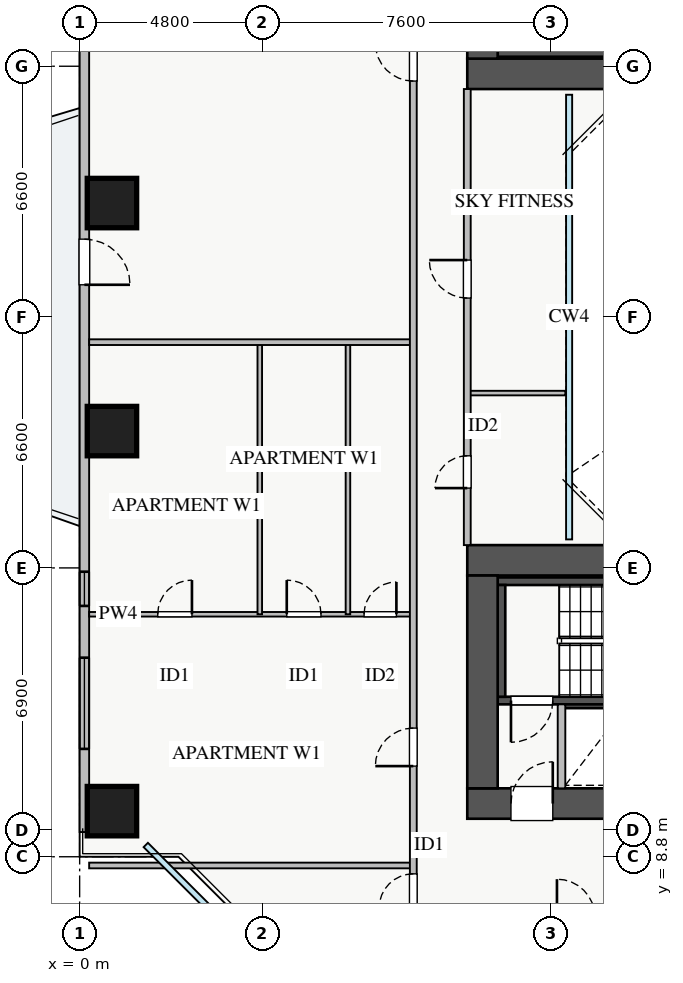
"""IFC4 building model, lengths in metres.
Left out: names, types, materials, properties, quantities, classifications, styles, units other than length and angle.
Written with IfcOpenShell. Run it as: python <this file> out.ifc"""

import sys

from ifc_helpers import new_model, si_unit, direction, frame, frame_2d, origin, origin_2d, place, context, subcontext, project, spatial, rectangle, extrude, source, transform, mapped, element, fill, save


model = new_model("IFC4")
c1 = context("Model", 3, precision=1e-05, world=origin(), true_north=direction((0.0, 1.0)))
c2 = subcontext(c1, "Body", "Model", "MODEL_VIEW")
j1 = project(units=[si_unit("LENGTHUNIT", "METRE"), si_unit("PLANEANGLEUNIT", "RADIAN")], contexts=[c1])
p1 = place(None, origin())
s1 = spatial("IfcSite", under=j1, at=p1, CompositionType="ELEMENT")
p2 = place(p1, origin())
s2 = spatial("IfcBuilding", under=s1, at=p2, CompositionType="ELEMENT")
p3 = place(p2, frame((0.0, 0.0, 26.25)))
s3 = spatial("IfcBuildingStorey", under=s2, at=p3, CompositionType="ELEMENT", Elevation=26.25)
p4 = place(p3, frame((12.68, 12.8, 0.0), z_axis=(0.0, 0.0, 1.0), x_axis=(1.0, 0.0, 0.0)))
e1 = element("IfcWall", 1, at=p4, inside=s3, PredefinedType="SHEAR", context=c2, shape_type="SweptSolid", body=[
    extrude(rectangle(XDim=1.94, YDim=0.18, at=frame_2d((0.97, 0.0))), origin(), (0.0, 0.0, 1.0), 3.07),
])
p5 = place(p3, frame((11.0, 29.95, 0.0), z_axis=(0.0, 0.0, 1.0), x_axis=(1.0, 0.0, 0.0)))
e2 = element("IfcWall", 2, at=p5, inside=s3, PredefinedType="SHEAR", context=c2, shape_type="SweptSolid", body=[
    extrude(rectangle(XDim=7.15, YDim=0.2, at=frame_2d((3.575, 0.0))), origin(), (0.0, 0.0, 1.0), 3.25),
])
p6 = place(p3, frame((11.0, 12.91, 0.0), z_axis=(0.0, 0.0, 1.0), x_axis=(1.0, 0.0, 0.0)))
e3 = element("IfcWall", 3, at=p6, inside=s3, PredefinedType="SHEAR", context=c2, shape_type="SweptSolid", body=[
    extrude(rectangle(XDim=7.15, YDim=0.2, at=frame_2d((3.575, 0.0))), origin(), (0.0, 0.0, 1.0), 3.25),
])
p7 = place(p6, frame((0.35, 0.0, 0.0)))
e4 = element("IfcOpeningElement", 4, at=p7, cuts=e3, PredefinedType="OPENING", context=c2, shape_type="SweptSolid", body=[
    extrude(rectangle(XDim=1.1, YDim=2.05, at=frame_2d((0.55, 1.025))), frame((0.0, 0.11, 0.0), z_axis=(0.0, -1.0, 0.0), x_axis=(1.0, 0.0, 0.0)), (0.0, 0.0, 1.0), 0.22),
])
p8 = place(p3, frame((11.0, 16.05, 0.0), z_axis=(0.0, 0.0, 1.0), x_axis=(1.0, 0.0, 0.0)))
e5 = element("IfcWall", 5, at=p8, inside=s3, PredefinedType="SHEAR", context=c2, shape_type="SweptSolid", body=[
    extrude(rectangle(XDim=7.15, YDim=0.2, at=frame_2d((3.575, 0.0))), origin(), (0.0, 0.0, 1.0), 3.25),
])
p9 = place(p3, frame((11.1, 13.01, 0.0), z_axis=(0.0, 0.0, 1.0), x_axis=(0.0, 1.0, 0.0)))
e6 = element("IfcWall", 6, at=p9, inside=s3, PredefinedType="SHEAR", context=c2, shape_type="SweptSolid", body=[
    extrude(rectangle(XDim=2.94, YDim=0.2, at=frame_2d((1.47, 0.0))), origin(), (0.0, 0.0, 1.0), 3.25),
])
p10 = place(p3, frame((10.2, 29.4, 0.0), z_axis=(0.0, 0.0, 1.0), x_axis=(1.0, 0.0, 0.0)))
e7 = element("IfcWall", 7, at=p10, inside=s3, PredefinedType="SHEAR", context=c2, shape_type="SweptSolid", body=[
    extrude(rectangle(XDim=17.6, YDim=0.8, at=frame_2d((8.8, 0.0))), origin(), (0.0, 0.0, 1.0), 3.25),
])
p11 = place(p3, frame((10.6, 29.8, 0.0), z_axis=(0.0, 0.0, 1.0), x_axis=(0.0, 1.0, 0.0)))
e8 = element("IfcWall", 8, at=p11, inside=s3, PredefinedType="SHEAR", context=c2, shape_type="SweptSolid", body=[
    extrude(rectangle(XDim=5.6, YDim=0.8, at=frame_2d((2.8, 0.0))), origin(), (0.0, 0.0, 1.0), 3.25),
])
p12 = place(p3, frame((10.2, 10.2, 0.0), z_axis=(0.0, 0.0, 1.0), x_axis=(1.0, 0.0, 0.0)))
e9 = element("IfcWall", 9, at=p12, inside=s3, PredefinedType="SHEAR", context=c2, shape_type="SweptSolid", body=[
    extrude(rectangle(XDim=17.6, YDim=0.8, at=frame_2d((8.8, 0.0))), origin(), (0.0, 0.0, 1.0), 3.25),
])
p13 = place(p12, frame((1.15, 0.0, 0.0)))
e10 = element("IfcOpeningElement", 10, at=p13, cuts=e9, PredefinedType="OPENING", context=c2, shape_type="SweptSolid", body=[
    extrude(rectangle(XDim=1.1, YDim=2.05, at=frame_2d((0.55, 1.025))), frame((0.0, 0.41, 0.0), z_axis=(0.0, -1.0, 0.0), x_axis=(1.0, 0.0, 0.0)), (0.0, 0.0, 1.0), 0.82),
])
p14 = place(p12, frame((8.3, 0.0, 0.0)))
e11 = element("IfcOpeningElement", 11, at=p14, cuts=e9, PredefinedType="OPENING", context=c2, shape_type="SweptSolid", body=[
    extrude(rectangle(XDim=1.1, YDim=2.05, at=frame_2d((0.55, 1.025))), frame((0.0, 0.41, 0.0), z_axis=(0.0, -1.0, 0.0), x_axis=(1.0, 0.0, 0.0)), (0.0, 0.0, 1.0), 0.82),
])
p15 = place(p12, frame((10.05, 0.0, 0.0)))
e12 = element("IfcOpeningElement", 12, at=p15, cuts=e9, PredefinedType="OPENING", context=c2, shape_type="SweptSolid", body=[
    extrude(rectangle(XDim=1.1, YDim=2.05, at=frame_2d((0.55, 1.025))), frame((0.0, 0.41, 0.0), z_axis=(0.0, -1.0, 0.0), x_axis=(1.0, 0.0, 0.0)), (0.0, 0.0, 1.0), 0.82),
])
p16 = place(p12, frame((14.74, 0.0, 0.0)))
e13 = element("IfcOpeningElement", 13, at=p16, cuts=e9, PredefinedType="OPENING", context=c2, shape_type="SweptSolid", body=[
    extrude(rectangle(XDim=1.0, YDim=2.05, at=frame_2d((0.5, 1.025))), frame((0.0, 0.41, 0.0), z_axis=(0.0, -1.0, 0.0), x_axis=(1.0, 0.0, 0.0)), (0.0, 0.0, 1.0), 0.82),
])
p17 = place(p12, frame((11.945, 0.0, 0.0)))
e14 = element("IfcOpeningElement", 14, at=p17, cuts=e9, PredefinedType="OPENING", context=c2, shape_type="SweptSolid", body=[
    extrude(rectangle(XDim=1.0, YDim=2.05, at=frame_2d((0.5, 1.025))), frame((0.0, 0.41, 0.0), z_axis=(0.0, -1.0, 0.0), x_axis=(1.0, 0.0, 0.0)), (0.0, 0.0, 1.0), 0.82),
])
p18 = place(p12, frame((13.48, 0.0, 0.0)))
e15 = element("IfcOpeningElement", 15, at=p18, cuts=e9, PredefinedType="OPENING", context=c2, shape_type="SweptSolid", body=[
    extrude(rectangle(XDim=1.0, YDim=2.05, at=frame_2d((0.5, 1.025))), frame((0.0, 0.41, 0.0), z_axis=(0.0, -1.0, 0.0), x_axis=(1.0, 0.0, 0.0)), (0.0, 0.0, 1.0), 0.82),
])
p19 = place(p3, frame((10.2, 16.6, 0.0), z_axis=(0.0, 0.0, 1.0), x_axis=(1.0, 0.0, 0.0)))
e16 = element("IfcWall", 16, at=p19, inside=s3, PredefinedType="SHEAR", context=c2, shape_type="SweptSolid", body=[
    extrude(rectangle(XDim=17.6, YDim=0.8, at=frame_2d((8.8, 0.0))), origin(), (0.0, 0.0, 1.0), 3.25),
])
p20 = place(p3, frame((10.6, 10.6, 0.0), z_axis=(0.0, 0.0, 1.0), x_axis=(0.0, 1.0, 0.0)))
e17 = element("IfcWall", 17, at=p20, inside=s3, PredefinedType="SHEAR", context=c2, shape_type="SweptSolid", body=[
    extrude(rectangle(XDim=5.6, YDim=0.8, at=frame_2d((2.8, 0.0))), origin(), (0.0, 0.0, 1.0), 3.25),
])
m1 = source(origin(), c2, "Body", "SweptSolid", [
    extrude(rectangle(XDim=1.3, YDim=1.3, at=origin_2d()), origin(), (0.0, 0.0, 1.0), 3.25),
])
for number, where, z_axis, x_axis in (
    (18, (0.85, 26.0, 0.0), (0.0, 0.0, 1.0), (1.0, 0.0, 0.0)),
    (19, (0.85, 20.0, 0.0), (0.0, 0.0, 1.0), (1.0, 0.0, 0.0)),
    (20, (0.85, 10.0, 0.0), (0.0, 0.0, 1.0), (1.0, 0.0, 0.0)),
):
    element("IfcColumn", number, at=place(p3, frame(where, z_axis=z_axis, x_axis=x_axis)), inside=s3, PredefinedType="COLUMN", context=c2, shape_type="MappedRepresentation", body=[
        mapped(m1, transform((0.0, 0.0, 0.0), x_axis=(1.0, 0.0, 0.0), y_axis=(0.0, 1.0, 0.0), z_axis=(0.0, 0.0, 1.0), scale=1.0)),
    ])
p21 = place(p3, frame((0.125, 9.45, 0.0), z_axis=(0.0, 0.0, 1.0), x_axis=(0.0, 1.0, 0.0)))
e21 = element("IfcWall", 21, at=p21, inside=s3, PredefinedType="STANDARD", context=c2, shape_type="SweptSolid", body=[
    extrude(rectangle(XDim=27.1, YDim=0.25, at=frame_2d((13.55, 0.0))), origin(), (0.0, 0.0, 1.0), 2.61),
])
p22 = place(p21, frame((14.4, 0.0, 0.0)))
e22 = element("IfcOpeningElement", 22, at=p22, cuts=e21, PredefinedType="OPENING", context=c2, shape_type="SweptSolid", body=[
    extrude(rectangle(XDim=1.2, YDim=2.1, at=frame_2d((0.6, 1.05))), frame((0.0, 0.135, 0.0), z_axis=(0.0, -1.0, 0.0), x_axis=(1.0, 0.0, 0.0)), (0.0, 0.0, 1.0), 0.27),
])
p23 = place(p21, frame((2.188, 0.0, 0.9)))
e23 = element("IfcOpeningElement", 23, at=p23, cuts=e21, PredefinedType="OPENING", context=c2, shape_type="SweptSolid", body=[
    extrude(rectangle(XDim=2.4, YDim=1.48, at=frame_2d((1.2, 0.74))), frame((0.0, 0.135, 0.0), z_axis=(0.0, -1.0, 0.0), x_axis=(1.0, 0.0, 0.0)), (0.0, 0.0, 1.0), 0.27),
])
p24 = place(p21, frame((22.663, 0.0, 0.9)))
e24 = element("IfcOpeningElement", 24, at=p24, cuts=e21, PredefinedType="OPENING", context=c2, shape_type="SweptSolid", body=[
    extrude(rectangle(XDim=2.1, YDim=1.48, at=frame_2d((1.05, 0.74))), frame((0.0, 0.135, 0.0), z_axis=(0.0, -1.0, 0.0), x_axis=(1.0, 0.0, 0.0)), (0.0, 0.0, 1.0), 0.27),
])
p25 = place(p21, frame((5.95, 0.0, 0.9)))
e25 = element("IfcOpeningElement", 25, at=p25, cuts=e21, PredefinedType="OPENING", context=c2, shape_type="SweptSolid", body=[
    extrude(rectangle(XDim=0.9, YDim=1.2, at=frame_2d((0.45, 0.6))), frame((0.0, 0.135, 0.0), z_axis=(0.0, -1.0, 0.0), x_axis=(1.0, 0.0, 0.0)), (0.0, 0.0, 1.0), 0.27),
])
p26 = place(p3, frame((12.68, 10.6, 0.0), z_axis=(0.0, 0.0, 1.0), x_axis=(0.0, 1.0, 0.0)))
e26 = element("IfcWall", 26, at=p26, inside=s3, PredefinedType="PARTITIONING", context=c2, shape_type="SweptSolid", body=[
    extrude(rectangle(XDim=2.21, YDim=0.2, at=frame_2d((1.105, 0.0))), origin(), (0.0, 0.0, 1.0), 3.07),
])
p27 = place(p3, frame((0.25, 8.57, 0.0), z_axis=(0.0, 0.0, 1.0), x_axis=(1.0, 0.0, 0.0)))
e27 = element("IfcWall", 27, at=p27, inside=s3, PredefinedType="PARTITIONING", context=c2, shape_type="SweptSolid", body=[
    extrude(rectangle(XDim=8.53, YDim=0.15, at=frame_2d((4.265, 0.0))), origin(), (0.0, 0.0, 1.0), 3.07),
])
p28 = place(p3, frame((0.25, 15.18, 0.0), z_axis=(0.0, 0.0, 1.0), x_axis=(1.0, 0.0, 0.0)))
e28 = element("IfcWall", 28, at=p28, inside=s3, PredefinedType="PLUMBINGWALL", context=c2, shape_type="SweptSolid", body=[
    extrude(rectangle(XDim=8.53, YDim=0.12, at=frame_2d((4.265, 0.0))), origin(), (0.0, 0.0, 1.0), 3.07),
])
p29 = place(p28, frame((1.805, 0.0, 0.0)))
e29 = element("IfcOpeningElement", 29, at=p29, cuts=e28, PredefinedType="OPENING", context=c2, shape_type="SweptSolid", body=[
    extrude(rectangle(XDim=0.9, YDim=2.05, at=frame_2d((0.45, 1.025))), frame((0.0, 0.07, 0.0), z_axis=(0.0, -1.0, 0.0), x_axis=(1.0, 0.0, 0.0)), (0.0, 0.0, 1.0), 0.14),
])
p30 = place(p28, frame((5.2, 0.0, 0.0)))
e30 = element("IfcOpeningElement", 30, at=p30, cuts=e28, PredefinedType="OPENING", context=c2, shape_type="SweptSolid", body=[
    extrude(rectangle(XDim=0.9, YDim=2.05, at=frame_2d((0.45, 1.025))), frame((0.0, 0.07, 0.0), z_axis=(0.0, -1.0, 0.0), x_axis=(1.0, 0.0, 0.0)), (0.0, 0.0, 1.0), 0.14),
])
p31 = place(p28, frame((7.235, 0.0, 0.0)))
e31 = element("IfcOpeningElement", 31, at=p31, cuts=e28, PredefinedType="OPENING", context=c2, shape_type="SweptSolid", body=[
    extrude(rectangle(XDim=0.85, YDim=2.05, at=frame_2d((0.425, 1.025))), frame((0.0, 0.07, 0.0), z_axis=(0.0, -1.0, 0.0), x_axis=(1.0, 0.0, 0.0)), (0.0, 0.0, 1.0), 0.14),
])
for number, where, z_axis, x_axis in (
    (32, (4.74, 15.18, 0.0), (0.0, 0.0, 1.0), (0.0, 1.0, 0.0)),
    (33, (7.06, 15.18, 0.0), (0.0, 0.0, 1.0), (0.0, 1.0, 0.0)),
):
    element("IfcWall", number, at=place(p3, frame(where, z_axis=z_axis, x_axis=x_axis)), inside=s3, PredefinedType="PLUMBINGWALL", context=c2, shape_type="SweptSolid", body=[
        extrude(rectangle(XDim=7.16, YDim=0.12, at=frame_2d((3.58, 0.0))), origin(), (0.0, 0.0, 1.0), 3.07),
    ])
p32 = place(p3, frame((0.25, 22.34, 0.0), z_axis=(0.0, 0.0, 1.0), x_axis=(1.0, 0.0, 0.0)))
e34 = element("IfcWall", 34, at=p32, inside=s3, PredefinedType="PARTITIONING", context=c2, shape_type="SweptSolid", body=[
    extrude(rectangle(XDim=8.53, YDim=0.15, at=frame_2d((4.265, 0.0))), origin(), (0.0, 0.0, 1.0), 3.07),
])
p33 = place(p3, frame((8.78, 7.21, 0.0), z_axis=(0.0, 0.0, 1.0), x_axis=(0.0, 1.0, 0.0)))
e35 = element("IfcWall", 35, at=p33, inside=s3, PredefinedType="PARTITIONING", context=c2, shape_type="SweptSolid", body=[
    extrude(rectangle(XDim=31.23, YDim=0.18, at=frame_2d((15.615, 0.0))), origin(), (0.0, 0.0, 1.0), 3.07),
])
p34 = place(p33, frame((30.09, 0.0, 0.0)))
e36 = element("IfcOpeningElement", 36, at=p34, cuts=e35, PredefinedType="OPENING", context=c2, shape_type="SweptSolid", body=[
    extrude(rectangle(XDim=0.9, YDim=2.05, at=frame_2d((0.45, 1.025))), frame((0.0, 0.1, 0.0), z_axis=(0.0, -1.0, 0.0), x_axis=(1.0, 0.0, 0.0)), (0.0, 0.0, 1.0), 0.2),
])
p35 = place(p33, frame((0.24, 0.0, 0.0)))
e37 = element("IfcOpeningElement", 37, at=p35, cuts=e35, PredefinedType="OPENING", context=c2, shape_type="SweptSolid", body=[
    extrude(rectangle(XDim=0.9, YDim=2.05, at=frame_2d((0.45, 1.025))), frame((0.0, 0.1, 0.0), z_axis=(0.0, -1.0, 0.0), x_axis=(1.0, 0.0, 0.0)), (0.0, 0.0, 1.0), 0.2),
])
p36 = place(p33, frame((3.975, 0.0, 0.0)))
e38 = element("IfcOpeningElement", 38, at=p36, cuts=e35, PredefinedType="OPENING", context=c2, shape_type="SweptSolid", body=[
    extrude(rectangle(XDim=1.0, YDim=2.05, at=frame_2d((0.5, 1.025))), frame((0.0, 0.1, 0.0), z_axis=(0.0, -1.0, 0.0), x_axis=(1.0, 0.0, 0.0)), (0.0, 0.0, 1.0), 0.2),
])
p37 = place(p33, frame((22.0, 0.0, 0.0)))
e39 = element("IfcOpeningElement", 39, at=p37, cuts=e35, PredefinedType="OPENING", context=c2, shape_type="SweptSolid", body=[
    extrude(rectangle(XDim=1.0, YDim=2.05, at=frame_2d((0.5, 1.025))), frame((0.0, 0.1, 0.0), z_axis=(0.0, -1.0, 0.0), x_axis=(1.0, 0.0, 0.0)), (0.0, 0.0, 1.0), 0.2),
])
p38 = place(p3, frame((10.2, 21.0, 0.0), z_axis=(0.0, 0.0, 1.0), x_axis=(1.0, 0.0, 0.0)))
e40 = element("IfcWall", 40, at=p38, inside=s3, PredefinedType="PLUMBINGWALL", context=c2, shape_type="SweptSolid", body=[
    extrude(rectangle(XDim=2.58, YDim=0.12, at=frame_2d((1.29, 0.0))), origin(), (0.0, 0.0, 1.0), 3.07),
])
p39 = place(p3, frame((10.2, 17.0, 0.0), z_axis=(0.0, 0.0, 1.0), x_axis=(0.0, 1.0, 0.0)))
e41 = element("IfcWall", 41, at=p39, inside=s3, PredefinedType="PARTITIONING", context=c2, shape_type="SweptSolid", body=[
    extrude(rectangle(XDim=12.0, YDim=0.18, at=frame_2d((6.0, 0.0))), origin(), (0.0, 0.0, 1.0), 3.07),
])
p40 = place(p39, frame((1.5, 0.0, 0.0)))
e42 = element("IfcOpeningElement", 42, at=p40, cuts=e41, PredefinedType="OPENING", context=c2, shape_type="SweptSolid", body=[
    extrude(rectangle(XDim=0.85, YDim=2.05, at=frame_2d((0.425, 1.025))), frame((0.0, 0.1, 0.0), z_axis=(0.0, -1.0, 0.0), x_axis=(1.0, 0.0, 0.0)), (0.0, 0.0, 1.0), 0.2),
])
p41 = place(p39, frame((6.5, 0.0, 0.0)))
e43 = element("IfcOpeningElement", 43, at=p41, cuts=e41, PredefinedType="OPENING", context=c2, shape_type="SweptSolid", body=[
    extrude(rectangle(XDim=1.0, YDim=2.05, at=frame_2d((0.5, 1.025))), frame((0.0, 0.1, 0.0), z_axis=(0.0, -1.0, 0.0), x_axis=(1.0, 0.0, 0.0)), (0.0, 0.0, 1.0), 0.2),
])
m2 = source(origin(), c2, "Body", "SweptSolid", [
    extrude(rectangle(XDim=1.2, YDim=2.1, at=frame_2d((0.6, 1.05))), frame((0.0, 0.025, 0.0), z_axis=(0.0, -1.0, 0.0), x_axis=(1.0, 0.0, 0.0)), (0.0, 0.0, 1.0), 0.05),
])
p42 = place(p22, frame((1.2, 0.0, 0.0), z_axis=(0.0, 0.0, 1.0), x_axis=(-1.0, 0.0, 0.0)))
e44 = element("IfcDoor", 44, at=p42, inside=s3, OperationType="SINGLE_SWING_LEFT", PredefinedType="DOOR", context=c2, shape_type="MappedRepresentation", body=[
    mapped(m2, transform((0.0, 0.0, 0.0), x_axis=(1.0, 0.0, 0.0), y_axis=(0.0, 1.0, 0.0), z_axis=(0.0, 0.0, 1.0), scale=1.0)),
])
fill(e22, e44)
m3 = source(origin(), c2, "Body", "SweptSolid", [
    extrude(rectangle(XDim=2.4, YDim=1.48, at=frame_2d((1.2, 0.74))), frame((0.0, 0.03, 0.0), z_axis=(0.0, -1.0, 0.0), x_axis=(1.0, 0.0, 0.0)), (0.0, 0.0, 1.0), 0.06),
])
p43 = place(p23, origin())
e45 = element("IfcWindow", 45, at=p43, inside=s3, PartitioningType="TRIPLE_PANEL_VERTICAL", PredefinedType="WINDOW", context=c2, shape_type="MappedRepresentation", body=[
    mapped(m3, transform((0.0, 0.0, 0.0), x_axis=(1.0, 0.0, 0.0), y_axis=(0.0, 1.0, 0.0), z_axis=(0.0, 0.0, 1.0), scale=1.0)),
])
fill(e23, e45)
m4 = source(origin(), c2, "Body", "SweptSolid", [
    extrude(rectangle(XDim=1.1, YDim=2.05, at=frame_2d((0.55, 1.025))), frame((0.0, 0.025, 0.0), z_axis=(0.0, -1.0, 0.0), x_axis=(1.0, 0.0, 0.0)), (0.0, 0.0, 1.0), 0.05),
])
p44 = place(p13, origin())
e46 = element("IfcDoor", 46, at=p44, inside=s3, OperationType="SINGLE_SWING_RIGHT", PredefinedType="DOOR", context=c2, shape_type="MappedRepresentation", body=[
    mapped(m4, transform((0.0, 0.0, 0.0), x_axis=(1.0, 0.0, 0.0), y_axis=(0.0, 1.0, 0.0), z_axis=(0.0, 0.0, 1.0), scale=1.0)),
])
fill(e10, e46)
p45 = place(p7, frame((1.1, 0.0, 0.0), z_axis=(0.0, 0.0, 1.0), x_axis=(-1.0, 0.0, 0.0)))
e47 = element("IfcDoor", 47, at=p45, inside=s3, OperationType="SINGLE_SWING_LEFT", PredefinedType="DOOR", context=c2, shape_type="MappedRepresentation", body=[
    mapped(m4, transform((0.0, 0.0, 0.0), x_axis=(1.0, 0.0, 0.0), y_axis=(0.0, 1.0, 0.0), z_axis=(0.0, 0.0, 1.0), scale=1.0)),
])
fill(e4, e47)
m5 = source(origin(), c2, "Body", "SweptSolid", [
    extrude(rectangle(XDim=0.9, YDim=2.05, at=frame_2d((0.45, 1.025))), frame((0.0, 0.025, 0.0), z_axis=(0.0, -1.0, 0.0), x_axis=(1.0, 0.0, 0.0)), (0.0, 0.0, 1.0), 0.05),
])
p46 = place(p29, origin())
e48 = element("IfcDoor", 48, at=p46, inside=s3, OperationType="SINGLE_SWING_RIGHT", PredefinedType="DOOR", context=c2, shape_type="MappedRepresentation", body=[
    mapped(m5, transform((0.0, 0.0, 0.0), x_axis=(1.0, 0.0, 0.0), y_axis=(0.0, 1.0, 0.0), z_axis=(0.0, 0.0, 1.0), scale=1.0)),
])
fill(e29, e48)
p47 = place(p30, origin())
e49 = element("IfcDoor", 49, at=p47, inside=s3, OperationType="SINGLE_SWING_LEFT", PredefinedType="DOOR", context=c2, shape_type="MappedRepresentation", body=[
    mapped(m5, transform((0.0, 0.0, 0.0), x_axis=(1.0, 0.0, 0.0), y_axis=(0.0, 1.0, 0.0), z_axis=(0.0, 0.0, 1.0), scale=1.0)),
])
fill(e30, e49)
m6 = source(origin(), c2, "Body", "SweptSolid", [
    extrude(rectangle(XDim=0.85, YDim=2.05, at=frame_2d((0.425, 1.025))), frame((0.0, 0.025, 0.0), z_axis=(0.0, -1.0, 0.0), x_axis=(1.0, 0.0, 0.0)), (0.0, 0.0, 1.0), 0.05),
])
p48 = place(p31, origin())
e50 = element("IfcDoor", 50, at=p48, inside=s3, OperationType="SINGLE_SWING_RIGHT", PredefinedType="DOOR", context=c2, shape_type="MappedRepresentation", body=[
    mapped(m6, transform((0.0, 0.0, 0.0), x_axis=(1.0, 0.0, 0.0), y_axis=(0.0, 1.0, 0.0), z_axis=(0.0, 0.0, 1.0), scale=1.0)),
])
fill(e31, e50)
p49 = place(p35, origin())
e51 = element("IfcDoor", 51, at=p49, inside=s3, OperationType="SINGLE_SWING_LEFT", PredefinedType="DOOR", context=c2, shape_type="MappedRepresentation", body=[
    mapped(m5, transform((0.0, 0.0, 0.0), x_axis=(1.0, 0.0, 0.0), y_axis=(0.0, 1.0, 0.0), z_axis=(0.0, 0.0, 1.0), scale=1.0)),
])
fill(e37, e51)
m7 = source(origin(), c2, "Body", "SweptSolid", [
    extrude(rectangle(XDim=1.0, YDim=2.05, at=frame_2d((0.5, 1.025))), frame((0.0, 0.025, 0.0), z_axis=(0.0, -1.0, 0.0), x_axis=(1.0, 0.0, 0.0)), (0.0, 0.0, 1.0), 0.05),
])
p50 = place(p36, origin())
e52 = element("IfcDoor", 52, at=p50, inside=s3, OperationType="SINGLE_SWING_LEFT", PredefinedType="DOOR", context=c2, shape_type="MappedRepresentation", body=[
    mapped(m7, transform((0.0, 0.0, 0.0), x_axis=(1.0, 0.0, 0.0), y_axis=(0.0, 1.0, 0.0), z_axis=(0.0, 0.0, 1.0), scale=1.0)),
])
fill(e38, e52)
p51 = place(p37, origin())
e53 = element("IfcDoor", 53, at=p51, inside=s3, OperationType="SINGLE_SWING_RIGHT", PredefinedType="DOOR", context=c2, shape_type="MappedRepresentation", body=[
    mapped(m7, transform((0.0, 0.0, 0.0), x_axis=(1.0, 0.0, 0.0), y_axis=(0.0, 1.0, 0.0), z_axis=(0.0, 0.0, 1.0), scale=1.0)),
])
fill(e39, e53)
p52 = place(p40, origin())
e54 = element("IfcDoor", 54, at=p52, inside=s3, OperationType="SINGLE_SWING_LEFT", PredefinedType="DOOR", context=c2, shape_type="MappedRepresentation", body=[
    mapped(m6, transform((0.0, 0.0, 0.0), x_axis=(1.0, 0.0, 0.0), y_axis=(0.0, 1.0, 0.0), z_axis=(0.0, 0.0, 1.0), scale=1.0)),
])
fill(e42, e54)
p53 = place(p41, origin())
e55 = element("IfcDoor", 55, at=p53, inside=s3, OperationType="SINGLE_SWING_RIGHT", PredefinedType="DOOR", context=c2, shape_type="MappedRepresentation", body=[
    mapped(m7, transform((0.0, 0.0, 0.0), x_axis=(1.0, 0.0, 0.0), y_axis=(0.0, 1.0, 0.0), z_axis=(0.0, 0.0, 1.0), scale=1.0)),
])
fill(e43, e55)
m8 = source(origin(), c2, "Body", "SweptSolid", [
    extrude(rectangle(XDim=0.9, YDim=1.2, at=frame_2d((0.45, 0.6))), frame((0.0, 0.03, 0.0), z_axis=(0.0, -1.0, 0.0), x_axis=(1.0, 0.0, 0.0)), (0.0, 0.0, 1.0), 0.06),
])
p54 = place(p25, origin())
e56 = element("IfcWindow", 56, at=p54, inside=s3, PartitioningType="SINGLE_PANEL", PredefinedType="WINDOW", context=c2, shape_type="MappedRepresentation", body=[
    mapped(m8, transform((0.0, 0.0, 0.0), x_axis=(1.0, 0.0, 0.0), y_axis=(0.0, 1.0, 0.0), z_axis=(0.0, 0.0, 1.0), scale=1.0)),
])
fill(e25, e56)
save(model, sys.argv[1])
